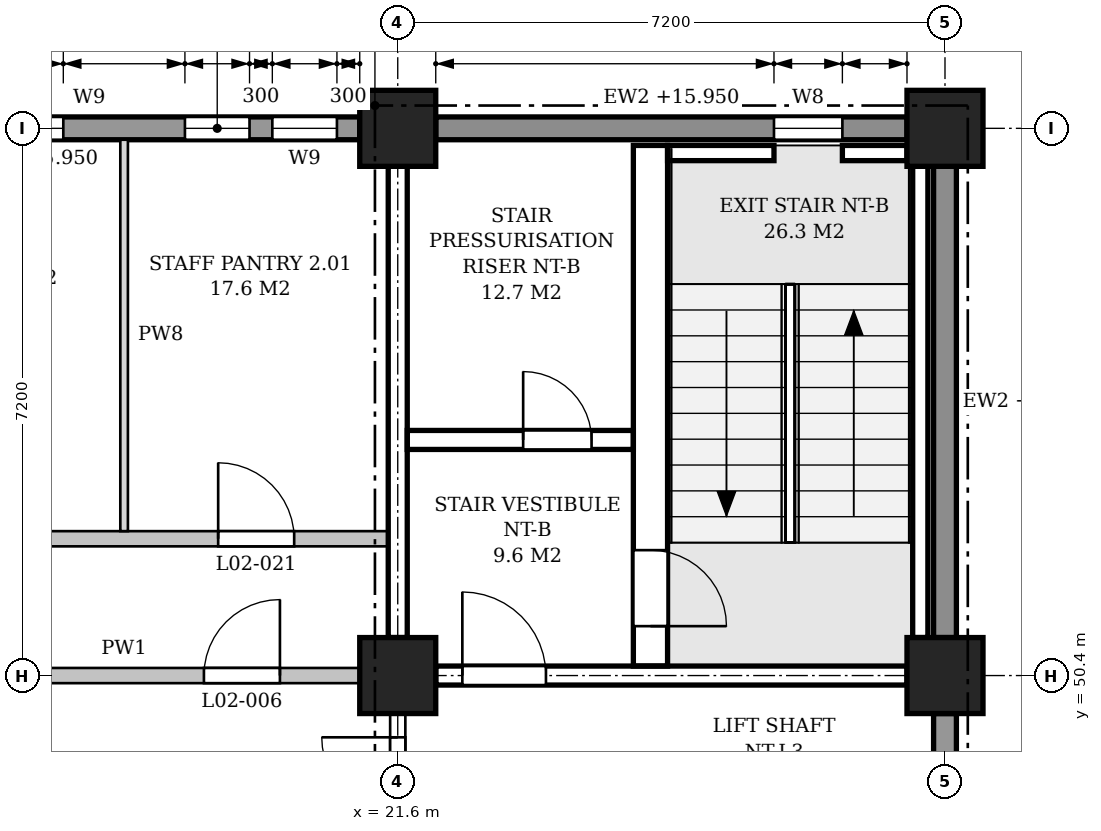
"""IFC4 building model, lengths in metres.
Left out: names, types, materials, properties, quantities, classifications, styles, units other than length and angle.
Written with IfcOpenShell. Run it as: python <this file> out.ifc"""

import sys

from ifc_helpers import new_model, si_unit, direction, frame, frame_2d, origin, origin_2d, place, context, subcontext, project, spatial, polyline, rectangle, outline, extrude, element, fill, save


model = new_model("IFC4")
c1 = context("Model", 3, precision=1e-05, world=origin(), true_north=direction((0.0, 1.0)))
c2 = subcontext(c1, "Body", "Model", "MODEL_VIEW")
j1 = project(units=[si_unit("LENGTHUNIT", "METRE"), si_unit("PLANEANGLEUNIT", "RADIAN")], contexts=[c1])
p1 = place(None, origin())
s1 = spatial("IfcSite", under=j1, at=p1, CompositionType="ELEMENT")
p2 = place(p1, origin())
s2 = spatial("IfcBuilding", under=s1, at=p2, CompositionType="ELEMENT")
p3 = place(p2, frame((0.0, 0.0, 11.4)))
s3 = spatial("IfcBuildingStorey", under=s2, at=p3, CompositionType="ELEMENT", Elevation=11.4)
for number, where, z_axis, x_axis in (
    (1, (21.6, 50.4, 0.0), (0.0, 0.0, 1.0), (1.0, 0.0, 0.0)),
    (2, (21.6, 57.6, 0.0), (0.0, 0.0, 1.0), (1.0, 0.0, 0.0)),
    (3, (28.8, 50.4, 0.0), (0.0, 0.0, 1.0), (1.0, 0.0, 0.0)),
    (4, (28.8, 57.6, 0.0), (0.0, 0.0, 1.0), (1.0, 0.0, 0.0)),
):
    element("IfcColumn", number, at=place(p3, frame(where, z_axis=z_axis, x_axis=x_axis)), inside=s3, PredefinedType="COLUMN", context=c2, shape_type="SweptSolid", body=[
        extrude(rectangle(XDim=1.0, YDim=1.0, at=origin_2d()), origin(), (0.0, 0.0, 1.0), 5.4),
    ])
p4 = place(p3, frame((28.3, 57.6, 0.0), z_axis=(0.0, 0.0, 1.0), x_axis=(-1.0, 0.0, 0.0)))
e5 = element("IfcWall", 5, at=p4, inside=s3, PredefinedType="STANDARD", context=c2, shape_type="SweptSolid", body=[
    extrude(rectangle(XDim=6.2, YDim=0.3, at=frame_2d((3.1, 0.0))), origin(), (0.0, 0.0, 1.0), 4.55),
])
p5 = place(p4, frame((0.85, 0.0, 0.9)))
e6 = element("IfcOpeningElement", 6, at=p5, cuts=e5, PredefinedType="OPENING", context=c2, shape_type="SweptSolid", body=[
    extrude(outline(polyline([(0.0, 0.0), (0.9, 0.0), (0.9, 2.65), (0.45, 3.1), (0.0, 2.65), (0.0, 0.0)])), frame((0.0, 0.16, 0.0), z_axis=(0.0, -1.0, 0.0), x_axis=(1.0, 0.0, 0.0)), (0.0, 0.0, 1.0), 0.32),
])
p6 = place(p3, frame((21.1, 57.6, 0.0), z_axis=(0.0, 0.0, 1.0), x_axis=(-1.0, 0.0, 0.0)))
e7 = element("IfcWall", 7, at=p6, inside=s3, PredefinedType="STANDARD", context=c2, shape_type="SweptSolid", body=[
    extrude(rectangle(XDim=6.2, YDim=0.3, at=frame_2d((3.1, 0.0))), origin(), (0.0, 0.0, 1.0), 4.55),
])
p7 = place(p6, frame((0.3, 0.0, 0.9)))
e8 = element("IfcOpeningElement", 8, at=p7, cuts=e7, PredefinedType="OPENING", context=c2, shape_type="SweptSolid", body=[
    extrude(outline(polyline([(0.0, 0.0), (0.85, 0.0), (0.85, 2.65), (0.425, 3.1), (0.0, 2.65), (0.0, 0.0)])), frame((0.0, 0.16, 0.0), z_axis=(0.0, -1.0, 0.0), x_axis=(1.0, 0.0, 0.0)), (0.0, 0.0, 1.0), 0.32),
])
p8 = place(p6, frame((1.45, 0.0, 0.9)))
e9 = element("IfcOpeningElement", 9, at=p8, cuts=e7, PredefinedType="OPENING", context=c2, shape_type="SweptSolid", body=[
    extrude(outline(polyline([(0.0, 0.0), (0.85, 0.0), (0.85, 2.65), (0.425, 3.1), (0.0, 2.65), (0.0, 0.0)])), frame((0.0, 0.16, 0.0), z_axis=(0.0, -1.0, 0.0), x_axis=(1.0, 0.0, 0.0)), (0.0, 0.0, 1.0), 0.32),
])
p9 = place(p6, frame((3.9, 0.0, 0.9)))
e10 = element("IfcOpeningElement", 10, at=p9, cuts=e7, PredefinedType="OPENING", context=c2, shape_type="SweptSolid", body=[
    extrude(outline(polyline([(0.0, 0.0), (0.85, 0.0), (0.85, 2.65), (0.425, 3.1), (0.0, 2.65), (0.0, 0.0)])), frame((0.0, 0.16, 0.0), z_axis=(0.0, -1.0, 0.0), x_axis=(1.0, 0.0, 0.0)), (0.0, 0.0, 1.0), 0.32),
])
p10 = place(p6, frame((5.05, 0.0, 0.9)))
e11 = element("IfcOpeningElement", 11, at=p10, cuts=e7, PredefinedType="OPENING", context=c2, shape_type="SweptSolid", body=[
    extrude(outline(polyline([(0.0, 0.0), (0.85, 0.0), (0.85, 2.65), (0.425, 3.1), (0.0, 2.65), (0.0, 0.0)])), frame((0.0, 0.16, 0.0), z_axis=(0.0, -1.0, 0.0), x_axis=(1.0, 0.0, 0.0)), (0.0, 0.0, 1.0), 0.32),
])
p11 = place(p3, frame((28.8, 43.7, 0.0), z_axis=(0.0, 0.0, 1.0), x_axis=(0.0, 1.0, 0.0)))
e12 = element("IfcWall", 12, at=p11, inside=s3, PredefinedType="STANDARD", context=c2, shape_type="SweptSolid", body=[
    extrude(rectangle(XDim=6.2, YDim=0.3, at=frame_2d((3.1, 0.0))), origin(), (0.0, 0.0, 1.0), 4.55),
])
p12 = place(p3, frame((28.8, 50.9, 0.0), z_axis=(0.0, 0.0, 1.0), x_axis=(0.0, 1.0, 0.0)))
e13 = element("IfcWall", 13, at=p12, inside=s3, PredefinedType="STANDARD", context=c2, shape_type="SweptSolid", body=[
    extrude(rectangle(XDim=6.2, YDim=0.3, at=frame_2d((3.1, 0.0))), origin(), (0.0, 0.0, 1.0), 4.55),
])
p13 = place(p3, frame((22.1, 50.4, 0.0), z_axis=(0.0, 0.0, 1.0), x_axis=(1.0, 0.0, 0.0)))
e14 = element("IfcWall", 14, at=p13, inside=s3, PredefinedType="SHEAR", context=c2, shape_type="SweptSolid", body=[
    extrude(rectangle(XDim=6.2, YDim=0.25, at=frame_2d((3.1, 0.0))), origin(), (0.0, 0.0, 1.0), 4.4),
])
p14 = place(p13, frame((0.35, 0.0, 0.0)))
e15 = element("IfcOpeningElement", 15, at=p14, cuts=e14, PredefinedType="OPENING", context=c2, shape_type="SweptSolid", body=[
    extrude(rectangle(XDim=1.1, YDim=2.1, at=frame_2d((0.55, 1.05))), frame((0.0, 0.135, 0.0), z_axis=(0.0, -1.0, 0.0), x_axis=(1.0, 0.0, 0.0)), (0.0, 0.0, 1.0), 0.27),
])
p15 = place(p3, frame((21.6, 50.9, 0.0), z_axis=(0.0, 0.0, 1.0), x_axis=(0.0, 1.0, 0.0)))
e16 = element("IfcWall", 16, at=p15, inside=s3, PredefinedType="SHEAR", context=c2, shape_type="SweptSolid", body=[
    extrude(rectangle(XDim=6.2, YDim=0.25, at=frame_2d((3.1, 0.0))), origin(), (0.0, 0.0, 1.0), 4.4),
])
p16 = place(p3, frame((28.475, 50.9, -0.25), z_axis=(0.0, 0.0, 1.0), x_axis=(0.0, 1.0, 0.0)))
e17 = element("IfcWall", 17, at=p16, inside=s3, PredefinedType="SHEAR", context=c2, shape_type="SweptSolid", body=[
    extrude(rectangle(XDim=6.2, YDim=0.2, at=frame_2d((3.1, 0.0))), origin(), (0.0, 0.0, 1.0), 5.4),
])
p17 = place(p3, frame((25.15, 57.275, -0.25), z_axis=(0.0, 0.0, 1.0), x_axis=(1.0, 0.0, 0.0)))
e18 = element("IfcWall", 18, at=p17, inside=s3, PredefinedType="SHEAR", context=c2, shape_type="SweptSolid", body=[
    extrude(rectangle(XDim=1.4, YDim=0.2, at=frame_2d((0.7, 0.0))), origin(), (0.0, 0.0, 1.0), 5.4),
])
p18 = place(p3, frame((27.45, 57.275, -0.25), z_axis=(0.0, 0.0, 1.0), x_axis=(1.0, 0.0, 0.0)))
e19 = element("IfcWall", 19, at=p18, inside=s3, PredefinedType="SHEAR", context=c2, shape_type="SweptSolid", body=[
    extrude(rectangle(XDim=0.85, YDim=0.2, at=frame_2d((0.425, 0.0))), origin(), (0.0, 0.0, 1.0), 5.4),
])
p19 = place(p3, frame((24.925, 50.525, 0.0), z_axis=(0.0, 0.0, 1.0), x_axis=(0.0, 1.0, 0.0)))
e20 = element("IfcWall", 20, at=p19, inside=s3, PredefinedType="SHEAR", context=c2, shape_type="SweptSolid", body=[
    extrude(rectangle(XDim=6.85, YDim=0.45, at=frame_2d((3.425, 0.0))), origin(), (0.0, 0.0, 1.0), 5.15),
])
p20 = place(p19, frame((0.525, 0.0, 0.0)))
e21 = element("IfcOpeningElement", 21, at=p20, cuts=e20, PredefinedType="OPENING", context=c2, shape_type="SweptSolid", body=[
    extrude(rectangle(XDim=1.0, YDim=2.1, at=frame_2d((0.5, 1.05))), frame((0.0, 0.235, 0.0), z_axis=(0.0, -1.0, 0.0), x_axis=(1.0, 0.0, 0.0)), (0.0, 0.0, 1.0), 0.47),
])
p21 = place(p3, frame((21.725, 53.5, 0.0), z_axis=(0.0, 0.0, 1.0), x_axis=(1.0, 0.0, 0.0)))
e22 = element("IfcWall", 22, at=p21, inside=s3, PredefinedType="SHEAR", context=c2, shape_type="SweptSolid", body=[
    extrude(rectangle(XDim=2.975, YDim=0.25, at=frame_2d((1.487, 0.0))), origin(), (0.0, 0.0, 1.0), 5.15),
])
p22 = place(p21, frame((1.525, 0.0, 0.0)))
e23 = element("IfcOpeningElement", 23, at=p22, cuts=e22, PredefinedType="OPENING", context=c2, shape_type="SweptSolid", body=[
    extrude(rectangle(XDim=0.9, YDim=2.1, at=frame_2d((0.45, 1.05))), frame((0.0, 0.135, 0.0), z_axis=(0.0, -1.0, 0.0), x_axis=(1.0, 0.0, 0.0)), (0.0, 0.0, 1.0), 0.27),
])
p23 = place(p3, frame((14.9, 50.4, 0.0), z_axis=(0.0, 0.0, 1.0), x_axis=(1.0, 0.0, 0.0)))
e24 = element("IfcWall", 24, at=p23, inside=s3, PredefinedType="PARTITIONING", context=c2, shape_type="SweptSolid", body=[
    extrude(rectangle(XDim=6.2, YDim=0.2, at=frame_2d((3.1, 0.0))), origin(), (0.0, 0.0, 1.0), 4.4),
])
p24 = place(p23, frame((4.15, 0.0, 0.0)))
e25 = element("IfcOpeningElement", 25, at=p24, cuts=e24, PredefinedType="OPENING", context=c2, shape_type="SweptSolid", body=[
    extrude(rectangle(XDim=1.0, YDim=2.1, at=frame_2d((0.5, 1.05))), frame((0.0, 0.11, 0.0), z_axis=(0.0, -1.0, 0.0), x_axis=(1.0, 0.0, 0.0)), (0.0, 0.0, 1.0), 0.22),
])
p25 = place(p3, frame((7.325, 52.2, 0.0), z_axis=(0.0, 0.0, 1.0), x_axis=(1.0, 0.0, 0.0)))
e26 = element("IfcWall", 26, at=p25, inside=s3, PredefinedType="PARTITIONING", context=c2, shape_type="SweptSolid", body=[
    extrude(outline(polyline([(0.0, 0.0), (14.15, 0.0), (14.15, 4.4), (14.025, 4.4), (14.025, 5.15), (7.325, 5.15), (7.325, 4.4), (6.825, 4.4), (6.825, 5.15), (0.125, 5.15), (0.125, 4.4), (0.0, 4.4), (0.0, 0.0)])), frame((0.0, 0.1, 0.0), z_axis=(0.0, -1.0, 0.0), x_axis=(1.0, 0.0, 0.0)), (0.0, 0.0, 1.0), 0.2),
])
p26 = place(p25, frame((1.238, 0.0, 0.0)))
e27 = element("IfcOpeningElement", 27, at=p26, cuts=e26, PredefinedType="OPENING", context=c2, shape_type="SweptSolid", body=[
    extrude(rectangle(XDim=1.0, YDim=2.1, at=frame_2d((0.5, 1.05))), frame((0.0, 0.11, 0.0), z_axis=(0.0, -1.0, 0.0), x_axis=(1.0, 0.0, 0.0)), (0.0, 0.0, 1.0), 0.22),
])
p27 = place(p25, frame((4.775, 0.0, 0.0)))
e28 = element("IfcOpeningElement", 28, at=p27, cuts=e26, PredefinedType="OPENING", context=c2, shape_type="SweptSolid", body=[
    extrude(rectangle(XDim=1.0, YDim=2.1, at=frame_2d((0.5, 1.05))), frame((0.0, 0.11, 0.0), z_axis=(0.0, -1.0, 0.0), x_axis=(1.0, 0.0, 0.0)), (0.0, 0.0, 1.0), 0.22),
])
p28 = place(p25, frame((8.375, 0.0, 0.0)))
e29 = element("IfcOpeningElement", 29, at=p28, cuts=e26, PredefinedType="OPENING", context=c2, shape_type="SweptSolid", body=[
    extrude(rectangle(XDim=1.0, YDim=2.1, at=frame_2d((0.5, 1.05))), frame((0.0, 0.11, 0.0), z_axis=(0.0, -1.0, 0.0), x_axis=(1.0, 0.0, 0.0)), (0.0, 0.0, 1.0), 0.22),
])
p29 = place(p25, frame((11.913, 0.0, 0.0)))
e30 = element("IfcOpeningElement", 30, at=p29, cuts=e26, PredefinedType="OPENING", context=c2, shape_type="SweptSolid", body=[
    extrude(rectangle(XDim=1.0, YDim=2.1, at=frame_2d((0.5, 1.05))), frame((0.0, 0.11, 0.0), z_axis=(0.0, -1.0, 0.0), x_axis=(1.0, 0.0, 0.0)), (0.0, 0.0, 1.0), 0.22),
])
p30 = place(p3, frame((18.0, 52.3, 0.0), z_axis=(0.0, 0.0, 1.0), x_axis=(0.0, 1.0, 0.0)))
e31 = element("IfcWall", 31, at=p30, inside=s3, PredefinedType="PARTITIONING", context=c2, shape_type="SweptSolid", body=[
    extrude(rectangle(XDim=5.15, YDim=0.1, at=frame_2d((2.575, 0.0))), origin(), (0.0, 0.0, 1.0), 4.4),
])
p31 = place(p3, frame((21.6, 47.275, 0.0), z_axis=(0.0, 0.0, 1.0), x_axis=(0.0, 1.0, 0.0)))
e32 = element("IfcWall", 32, at=p31, inside=s3, PredefinedType="PARTITIONING", context=c2, shape_type="SweptSolid", body=[
    extrude(rectangle(XDim=2.625, YDim=0.2, at=frame_2d((1.312, 0.0))), origin(), (0.0, 0.0, 1.0), 4.4),
])
p32 = place(p31, frame((0.312, 0.0, 0.0)))
e33 = element("IfcOpeningElement", 33, at=p32, cuts=e32, PredefinedType="OPENING", context=c2, shape_type="SweptSolid", body=[
    extrude(rectangle(XDim=2.0, YDim=2.4, at=frame_2d((1.0, 1.2))), frame((0.0, 0.11, 0.0), z_axis=(0.0, -1.0, 0.0), x_axis=(1.0, 0.0, 0.0)), (0.0, 0.0, 1.0), 0.22),
])
p33 = place(p5, origin())
e34 = element("IfcWindow", 34, at=p33, inside=s3, PartitioningType="SINGLE_PANEL", PredefinedType="WINDOW", context=c2, shape_type="SweptSolid", body=[
    extrude(outline(polyline([(0.0, 0.0), (0.9, 0.0), (0.9, 2.65), (0.45, 3.1), (0.0, 2.65), (0.0, 0.0)])), frame((0.0, 0.03, 0.0), z_axis=(0.0, -1.0, 0.0), x_axis=(1.0, 0.0, 0.0)), (0.0, 0.0, 1.0), 0.06),
])
fill(e6, e34)
p34 = place(p7, origin())
e35 = element("IfcWindow", 35, at=p34, inside=s3, PartitioningType="SINGLE_PANEL", PredefinedType="WINDOW", context=c2, shape_type="SweptSolid", body=[
    extrude(outline(polyline([(0.0, 0.0), (0.85, 0.0), (0.85, 2.65), (0.425, 3.1), (0.0, 2.65), (0.0, 0.0)])), frame((0.0, 0.03, 0.0), z_axis=(0.0, -1.0, 0.0), x_axis=(1.0, 0.0, 0.0)), (0.0, 0.0, 1.0), 0.06),
])
fill(e8, e35)
p35 = place(p8, origin())
e36 = element("IfcWindow", 36, at=p35, inside=s3, PartitioningType="SINGLE_PANEL", PredefinedType="WINDOW", context=c2, shape_type="SweptSolid", body=[
    extrude(outline(polyline([(0.0, 0.0), (0.85, 0.0), (0.85, 2.65), (0.425, 3.1), (0.0, 2.65), (0.0, 0.0)])), frame((0.0, 0.03, 0.0), z_axis=(0.0, -1.0, 0.0), x_axis=(1.0, 0.0, 0.0)), (0.0, 0.0, 1.0), 0.06),
])
fill(e9, e36)
p36 = place(p9, origin())
e37 = element("IfcWindow", 37, at=p36, inside=s3, PartitioningType="SINGLE_PANEL", PredefinedType="WINDOW", context=c2, shape_type="SweptSolid", body=[
    extrude(outline(polyline([(0.0, 0.0), (0.85, 0.0), (0.85, 2.65), (0.425, 3.1), (0.0, 2.65), (0.0, 0.0)])), frame((0.0, 0.03, 0.0), z_axis=(0.0, -1.0, 0.0), x_axis=(1.0, 0.0, 0.0)), (0.0, 0.0, 1.0), 0.06),
])
fill(e10, e37)
p37 = place(p20, frame((1.0, 0.0, 0.0), z_axis=(0.0, 0.0, 1.0), x_axis=(-1.0, 0.0, 0.0)))
e38 = element("IfcDoor", 38, at=p37, inside=s3, OperationType="SINGLE_SWING_RIGHT", PredefinedType="DOOR", context=c2, shape_type="SweptSolid", body=[
    extrude(rectangle(XDim=1.0, YDim=2.1, at=frame_2d((0.5, 1.05))), frame((0.0, 0.025, 0.0), z_axis=(0.0, -1.0, 0.0), x_axis=(1.0, 0.0, 0.0)), (0.0, 0.0, 1.0), 0.05),
])
fill(e21, e38)
p38 = place(p14, origin())
e39 = element("IfcDoor", 39, at=p38, inside=s3, OperationType="SINGLE_SWING_LEFT", PredefinedType="DOOR", context=c2, shape_type="SweptSolid", body=[
    extrude(rectangle(XDim=1.1, YDim=2.1, at=frame_2d((0.55, 1.05))), frame((0.0, 0.025, 0.0), z_axis=(0.0, -1.0, 0.0), x_axis=(1.0, 0.0, 0.0)), (0.0, 0.0, 1.0), 0.05),
])
fill(e15, e39)
p39 = place(p22, origin())
e40 = element("IfcDoor", 40, at=p39, inside=s3, OperationType="SINGLE_SWING_LEFT", PredefinedType="DOOR", context=c2, shape_type="SweptSolid", body=[
    extrude(rectangle(XDim=0.9, YDim=2.1, at=frame_2d((0.45, 1.05))), frame((0.0, 0.025, 0.0), z_axis=(0.0, -1.0, 0.0), x_axis=(1.0, 0.0, 0.0)), (0.0, 0.0, 1.0), 0.05),
])
fill(e23, e40)
p40 = place(p32, origin())
e41 = element("IfcDoor", 41, at=p40, inside=s3, OperationType="DOUBLE_DOOR_SINGLE_SWING", PredefinedType="DOOR", context=c2, shape_type="SweptSolid", body=[
    extrude(rectangle(XDim=2.0, YDim=2.4, at=frame_2d((1.0, 1.2))), frame((0.0, 0.025, 0.0), z_axis=(0.0, -1.0, 0.0), x_axis=(1.0, 0.0, 0.0)), (0.0, 0.0, 1.0), 0.05),
])
fill(e33, e41)
p41 = place(p24, origin())
e42 = element("IfcDoor", 42, at=p41, inside=s3, OperationType="SINGLE_SWING_RIGHT", PredefinedType="DOOR", context=c2, shape_type="SweptSolid", body=[
    extrude(rectangle(XDim=1.0, YDim=2.1, at=frame_2d((0.5, 1.05))), frame((0.0, 0.025, 0.0), z_axis=(0.0, -1.0, 0.0), x_axis=(1.0, 0.0, 0.0)), (0.0, 0.0, 1.0), 0.05),
])
fill(e25, e42)
p42 = place(p29, origin())
e43 = element("IfcDoor", 43, at=p42, inside=s3, OperationType="SINGLE_SWING_LEFT", PredefinedType="DOOR", context=c2, shape_type="SweptSolid", body=[
    extrude(rectangle(XDim=1.0, YDim=2.1, at=frame_2d((0.5, 1.05))), frame((0.0, 0.025, 0.0), z_axis=(0.0, -1.0, 0.0), x_axis=(1.0, 0.0, 0.0)), (0.0, 0.0, 1.0), 0.05),
])
fill(e30, e43)
save(model, sys.argv[1])
